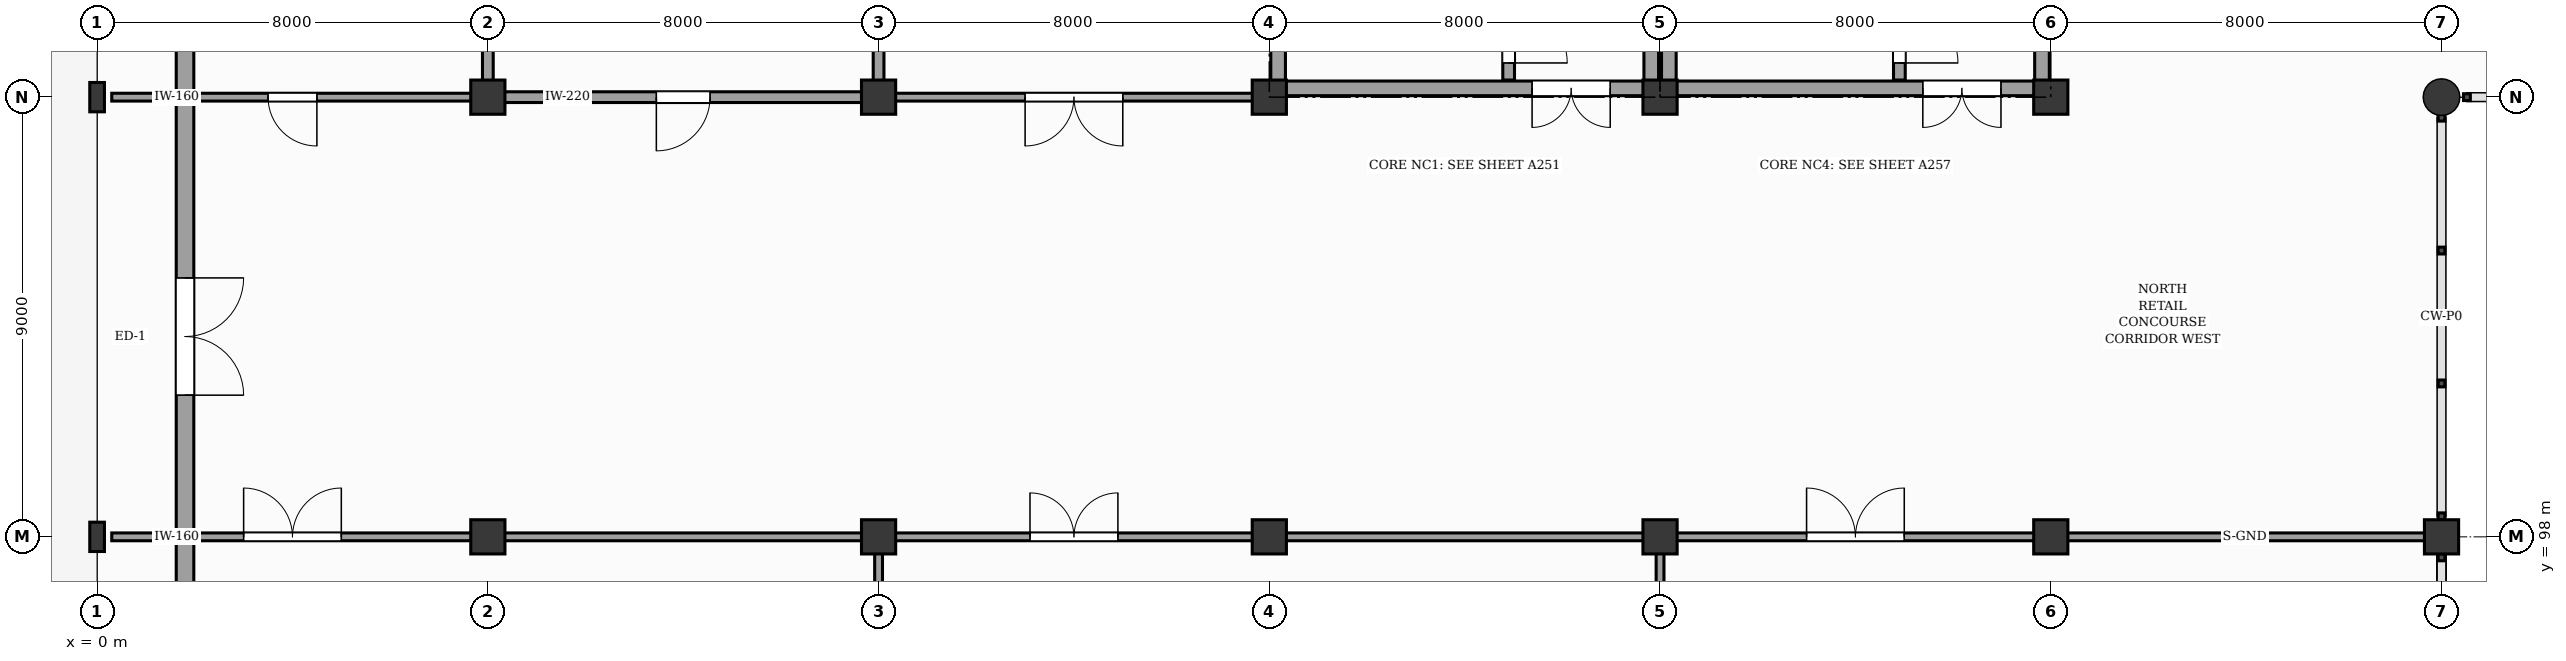
"""IFC4 building model, lengths in metres.
Left out: names, types, materials, properties, quantities, classifications, styles, units other than length and angle.
Written with IfcOpenShell. Run it as: python <this file> out.ifc"""

import sys

from ifc_helpers import new_model, si_unit, direction, frame, frame_2d, origin, origin_2d, place, context, subcontext, project, spatial, rectangle, circle, i_section, extrude, element, fill, save


model = new_model("IFC4")
c1 = context("Model", 3, precision=1e-05, world=origin(), true_north=direction((0.0, 1.0)))
c2 = subcontext(c1, "Body", "Model", "MODEL_VIEW")
j1 = project(units=[si_unit("LENGTHUNIT", "METRE"), si_unit("PLANEANGLEUNIT", "RADIAN")], contexts=[c1])
p1 = place(None, origin())
s1 = spatial("IfcSite", under=j1, at=p1, CompositionType="ELEMENT")
p2 = place(p1, origin())
s2 = spatial("IfcBuilding", under=s1, at=p2, CompositionType="ELEMENT")
p3 = place(p2, origin())
s3 = spatial("IfcBuildingStorey", under=s2, at=p3, CompositionType="ELEMENT", Elevation=0.0)
for number, where, z_axis, x_axis in (
    (1, (0.0, 98.0, -0.3), (0.0, 0.0, 1.0), (1.0, 0.0, 0.0)),
    (2, (0.0, 107.0, -0.3), (0.0, 0.0, 1.0), (1.0, 0.0, 0.0)),
):
    element("IfcColumn", number, at=place(p3, frame(where, z_axis=z_axis, x_axis=x_axis)), inside=s3, PredefinedType="COLUMN", context=c2, shape_type="SweptSolid", body=[
        extrude(i_section(OverallWidth=0.3, OverallDepth=0.6, WebThickness=0.015, FlangeThickness=0.03, FilletRadius=0.027, at=origin_2d()), origin(), (0.0, 0.0, 1.0), 5.1),
    ])
for number, where, z_axis, x_axis in (
    (3, (8.0, 98.0, -0.3), (0.0, 0.0, 1.0), (1.0, 0.0, 0.0)),
    (4, (8.0, 107.0, -0.3), (0.0, 0.0, 1.0), (1.0, 0.0, 0.0)),
    (5, (16.0, 98.0, -0.3), (0.0, 0.0, 1.0), (1.0, 0.0, 0.0)),
    (6, (16.0, 107.0, -0.3), (0.0, 0.0, 1.0), (1.0, 0.0, 0.0)),
    (7, (24.0, 98.0, -0.3), (0.0, 0.0, 1.0), (1.0, 0.0, 0.0)),
    (8, (24.0, 107.0, -0.3), (0.0, 0.0, 1.0), (1.0, 0.0, 0.0)),
    (9, (32.0, 98.0, -0.3), (0.0, 0.0, 1.0), (1.0, 0.0, 0.0)),
    (10, (32.0, 107.0, -0.3), (0.0, 0.0, 1.0), (1.0, 0.0, 0.0)),
    (11, (40.0, 98.0, -0.3), (0.0, 0.0, 1.0), (1.0, 0.0, 0.0)),
    (12, (40.0, 107.0, -0.3), (0.0, 0.0, 1.0), (1.0, 0.0, 0.0)),
    (13, (48.0, 98.0, -0.3), (0.0, 0.0, 1.0), (1.0, 0.0, 0.0)),
):
    element("IfcColumn", number, at=place(p3, frame(where, z_axis=z_axis, x_axis=x_axis)), inside=s3, PredefinedType="COLUMN", context=c2, shape_type="SweptSolid", body=[
        extrude(rectangle(XDim=0.7, YDim=0.7, at=origin_2d()), origin(), (0.0, 0.0, 1.0), 5.1),
    ])
p4 = place(p3, frame((48.0, 107.0, -0.3), z_axis=(0.0, 0.0, 1.0), x_axis=(1.0, 0.0, 0.0)))
e14 = element("IfcColumn", 14, at=p4, inside=s3, PredefinedType="PILASTER", context=c2, shape_type="SweptSolid", body=[
    extrude(circle(Radius=0.375, at=origin_2d()), origin(), (0.0, 0.0, 1.0), 5.1),
])
p5 = place(p3, frame((1.8, 89.0, 0.0), z_axis=(0.0, 0.0, 1.0), x_axis=(0.0, 1.0, 0.0)))
e15 = element("IfcWall", 15, at=p5, inside=s3, PredefinedType="SOLIDWALL", context=c2, shape_type="SweptSolid", body=[
    extrude(rectangle(XDim=9.0, YDim=0.36, at=frame_2d((4.5, 0.0))), origin(), (0.0, 0.0, 1.0), 3.71),
])
p6 = place(p5, frame((3.3, 0.0, 0.95)))
e16 = element("IfcOpeningElement", 16, at=p6, cuts=e15, PredefinedType="OPENING", context=c2, shape_type="SweptSolid", body=[
    extrude(rectangle(XDim=1.6, YDim=2.1, at=frame_2d((0.8, 1.05))), frame((0.0, 0.19, 0.0), z_axis=(0.0, -1.0, 0.0), x_axis=(1.0, 0.0, 0.0)), (0.0, 0.0, 1.0), 0.38),
])
p7 = place(p3, frame((1.8, 98.0, 0.0), z_axis=(0.0, 0.0, 1.0), x_axis=(0.0, 1.0, 0.0)))
e17 = element("IfcWall", 17, at=p7, inside=s3, PredefinedType="SOLIDWALL", context=c2, shape_type="SweptSolid", body=[
    extrude(rectangle(XDim=9.0, YDim=0.36, at=frame_2d((4.5, 0.0))), origin(), (0.0, 0.0, 1.0), 3.71),
])
p8 = place(p7, frame((2.9, 0.0, 0.0)))
e18 = element("IfcOpeningElement", 18, at=p8, cuts=e17, PredefinedType="OPENING", context=c2, shape_type="SweptSolid", body=[
    extrude(rectangle(XDim=2.4, YDim=2.35, at=frame_2d((1.2, 1.175))), frame((0.0, 0.19, 0.0), z_axis=(0.0, -1.0, 0.0), x_axis=(1.0, 0.0, 0.0)), (0.0, 0.0, 1.0), 0.38),
])
p9 = place(p3, frame((1.8, 107.0, 0.0), z_axis=(0.0, 0.0, 1.0), x_axis=(0.0, 1.0, 0.0)))
e19 = element("IfcWall", 19, at=p9, inside=s3, PredefinedType="SOLIDWALL", context=c2, shape_type="SweptSolid", body=[
    extrude(rectangle(XDim=7.2, YDim=0.36, at=frame_2d((3.6, 0.0))), origin(), (0.0, 0.0, 1.0), 3.76),
])
p10 = place(p9, frame((3.3, 0.0, 0.95)))
e20 = element("IfcOpeningElement", 20, at=p10, cuts=e19, PredefinedType="OPENING", context=c2, shape_type="SweptSolid", body=[
    extrude(rectangle(XDim=1.6, YDim=2.1, at=frame_2d((0.8, 1.05))), frame((0.0, 0.19, 0.0), z_axis=(0.0, -1.0, 0.0), x_axis=(1.0, 0.0, 0.0)), (0.0, 0.0, 1.0), 0.38),
])
p11 = place(p3, frame((28.9, 107.35, 0.0), z_axis=(0.0, 0.0, 1.0), x_axis=(0.0, 1.0, 0.0)))
e21 = element("IfcWall", 21, at=p11, inside=s3, PredefinedType="SHEAR", context=c2, shape_type="SweptSolid", body=[
    extrude(rectangle(XDim=8.3, YDim=0.24, at=frame_2d((4.15, 0.0))), origin(), (0.0, 0.0, 1.0), 4.52),
])
p12 = place(p11, frame((0.35, 0.0, 0.0)))
e22 = element("IfcOpeningElement", 22, at=p12, cuts=e21, PredefinedType="OPENING", context=c2, shape_type="SweptSolid", body=[
    extrude(rectangle(XDim=1.2, YDim=2.15, at=frame_2d((0.6, 1.075))), frame((0.0, 0.13, 0.0), z_axis=(0.0, -1.0, 0.0), x_axis=(1.0, 0.0, 0.0)), (0.0, 0.0, 1.0), 0.26),
])
for number, where, z_axis, x_axis in (
    (23, (24.18, 107.18, 0.0), (0.0, 0.0, 1.0), (0.0, 1.0, 0.0)),
    (24, (31.82, 107.18, 0.0), (0.0, 0.0, 1.0), (0.0, 1.0, 0.0)),
):
    element("IfcWall", number, at=place(p3, frame(where, z_axis=z_axis, x_axis=x_axis)), inside=s3, PredefinedType="SHEAR", context=c2, shape_type="SweptSolid", body=[
        extrude(rectangle(XDim=8.64, YDim=0.3, at=frame_2d((4.32, 0.0))), origin(), (0.0, 0.0, 1.0), 4.52),
    ])
p13 = place(p3, frame((24.03, 107.18, 0.0), z_axis=(0.0, 0.0, 1.0), x_axis=(1.0, 0.0, 0.0)))
e25 = element("IfcWall", 25, at=p13, inside=s3, PredefinedType="SHEAR", context=c2, shape_type="SweptSolid", body=[
    extrude(rectangle(XDim=7.94, YDim=0.3, at=frame_2d((3.97, 0.0))), origin(), (0.0, 0.0, 1.0), 4.52),
])
p14 = place(p13, frame((5.35, 0.0, 0.0)))
e26 = element("IfcOpeningElement", 26, at=p14, cuts=e25, PredefinedType="OPENING", context=c2, shape_type="SweptSolid", body=[
    extrude(rectangle(XDim=1.6, YDim=2.15, at=frame_2d((0.8, 1.075))), frame((0.0, 0.16, 0.0), z_axis=(0.0, -1.0, 0.0), x_axis=(1.0, 0.0, 0.0)), (0.0, 0.0, 1.0), 0.32),
])
p15 = place(p3, frame((36.9, 107.35, 0.0), z_axis=(0.0, 0.0, 1.0), x_axis=(0.0, 1.0, 0.0)))
e27 = element("IfcWall", 27, at=p15, inside=s3, PredefinedType="SHEAR", context=c2, shape_type="SweptSolid", body=[
    extrude(rectangle(XDim=8.3, YDim=0.24, at=frame_2d((4.15, 0.0))), origin(), (0.0, 0.0, 1.0), 4.52),
])
p16 = place(p15, frame((0.35, 0.0, 0.0)))
e28 = element("IfcOpeningElement", 28, at=p16, cuts=e27, PredefinedType="OPENING", context=c2, shape_type="SweptSolid", body=[
    extrude(rectangle(XDim=1.2, YDim=2.15, at=frame_2d((0.6, 1.075))), frame((0.0, 0.13, 0.0), z_axis=(0.0, -1.0, 0.0), x_axis=(1.0, 0.0, 0.0)), (0.0, 0.0, 1.0), 0.26),
])
for number, where, z_axis, x_axis in (
    (29, (32.18, 107.18, 0.0), (0.0, 0.0, 1.0), (0.0, 1.0, 0.0)),
    (30, (39.82, 107.18, 0.0), (0.0, 0.0, 1.0), (0.0, 1.0, 0.0)),
):
    element("IfcWall", number, at=place(p3, frame(where, z_axis=z_axis, x_axis=x_axis)), inside=s3, PredefinedType="SHEAR", context=c2, shape_type="SweptSolid", body=[
        extrude(rectangle(XDim=8.64, YDim=0.3, at=frame_2d((4.32, 0.0))), origin(), (0.0, 0.0, 1.0), 4.52),
    ])
p17 = place(p3, frame((32.03, 107.18, 0.0), z_axis=(0.0, 0.0, 1.0), x_axis=(1.0, 0.0, 0.0)))
e31 = element("IfcWall", 31, at=p17, inside=s3, PredefinedType="SHEAR", context=c2, shape_type="SweptSolid", body=[
    extrude(rectangle(XDim=7.94, YDim=0.3, at=frame_2d((3.97, 0.0))), origin(), (0.0, 0.0, 1.0), 4.52),
])
p18 = place(p17, frame((5.35, 0.0, 0.0)))
e32 = element("IfcOpeningElement", 32, at=p18, cuts=e31, PredefinedType="OPENING", context=c2, shape_type="SweptSolid", body=[
    extrude(rectangle(XDim=1.6, YDim=2.15, at=frame_2d((0.8, 1.075))), frame((0.0, 0.16, 0.0), z_axis=(0.0, -1.0, 0.0), x_axis=(1.0, 0.0, 0.0)), (0.0, 0.0, 1.0), 0.32),
])
p19 = place(p3, frame((8.3, 107.0, 0.0), z_axis=(0.0, 0.0, 1.0), x_axis=(1.0, 0.0, 0.0)))
e33 = element("IfcWall", 33, at=p19, inside=s3, PredefinedType="SOLIDWALL", context=c2, shape_type="SweptSolid", body=[
    extrude(rectangle(XDim=7.4, YDim=0.22, at=frame_2d((3.7, 0.0))), origin(), (0.0, 0.0, 1.0), 3.7),
])
p20 = place(p19, frame((3.15, 0.0, 0.0)))
e34 = element("IfcOpeningElement", 34, at=p20, cuts=e33, PredefinedType="OPENING", context=c2, shape_type="SweptSolid", body=[
    extrude(rectangle(XDim=1.1, YDim=2.15, at=frame_2d((0.55, 1.075))), frame((0.0, 0.12, 0.0), z_axis=(0.0, -1.0, 0.0), x_axis=(1.0, 0.0, 0.0)), (0.0, 0.0, 1.0), 0.24),
])
for number, where, z_axis, x_axis in (
    (35, (8.0, 107.3, 0.0), (0.0, 0.0, 1.0), (0.0, 1.0, 0.0)),
    (36, (16.0, 107.3, 0.0), (0.0, 0.0, 1.0), (0.0, 1.0, 0.0)),
):
    element("IfcWall", number, at=place(p3, frame(where, z_axis=z_axis, x_axis=x_axis)), inside=s3, PredefinedType="SOLIDWALL", context=c2, shape_type="SweptSolid", body=[
        extrude(rectangle(XDim=6.74, YDim=0.22, at=frame_2d((3.37, 0.0))), origin(), (0.0, 0.0, 1.0), 3.7),
    ])
p21 = place(p3, frame((0.3, 107.0, 0.0), z_axis=(0.0, 0.0, 1.0), x_axis=(1.0, 0.0, 0.0)))
e37 = element("IfcWall", 37, at=p21, inside=s3, PredefinedType="PARTITIONING", context=c2, shape_type="SweptSolid", body=[
    extrude(rectangle(XDim=7.4, YDim=0.16, at=frame_2d((3.7, 0.0))), origin(), (0.0, 0.0, 1.0), 3.7),
])
p22 = place(p21, frame((3.2, 0.0, 0.0)))
e38 = element("IfcOpeningElement", 38, at=p22, cuts=e37, PredefinedType="OPENING", context=c2, shape_type="SweptSolid", body=[
    extrude(rectangle(XDim=1.0, YDim=2.1, at=frame_2d((0.5, 1.05))), frame((0.0, 0.09, 0.0), z_axis=(0.0, -1.0, 0.0), x_axis=(1.0, 0.0, 0.0)), (0.0, 0.0, 1.0), 0.18),
])
p23 = place(p3, frame((16.3, 107.0, 0.0), z_axis=(0.0, 0.0, 1.0), x_axis=(1.0, 0.0, 0.0)))
e39 = element("IfcWall", 39, at=p23, inside=s3, PredefinedType="PARTITIONING", context=c2, shape_type="SweptSolid", body=[
    extrude(rectangle(XDim=7.4, YDim=0.16, at=frame_2d((3.7, 0.0))), origin(), (0.0, 0.0, 1.0), 3.7),
])
p24 = place(p23, frame((2.7, 0.0, 0.0)))
e40 = element("IfcOpeningElement", 40, at=p24, cuts=e39, PredefinedType="OPENING", context=c2, shape_type="SweptSolid", body=[
    extrude(rectangle(XDim=2.0, YDim=2.3, at=frame_2d((1.0, 1.15))), frame((0.0, 0.09, 0.0), z_axis=(0.0, -1.0, 0.0), x_axis=(1.0, 0.0, 0.0)), (0.0, 0.0, 1.0), 0.18),
])
p25 = place(p3, frame((0.3, 98.0, 0.0), z_axis=(0.0, 0.0, 1.0), x_axis=(1.0, 0.0, 0.0)))
e41 = element("IfcWall", 41, at=p25, inside=s3, PredefinedType="PARTITIONING", context=c2, shape_type="SweptSolid", body=[
    extrude(rectangle(XDim=7.4, YDim=0.16, at=frame_2d((3.7, 0.0))), origin(), (0.0, 0.0, 1.0), 3.7),
])
p26 = place(p25, frame((2.7, 0.0, 0.0)))
e42 = element("IfcOpeningElement", 42, at=p26, cuts=e41, PredefinedType="OPENING", context=c2, shape_type="SweptSolid", body=[
    extrude(rectangle(XDim=2.0, YDim=2.3, at=frame_2d((1.0, 1.15))), frame((0.0, 0.09, 0.0), z_axis=(0.0, -1.0, 0.0), x_axis=(1.0, 0.0, 0.0)), (0.0, 0.0, 1.0), 0.18),
])
p27 = place(p3, frame((8.3, 98.0, 0.0), z_axis=(0.0, 0.0, 1.0), x_axis=(1.0, 0.0, 0.0)))
e43 = element("IfcWall", 43, at=p27, inside=s3, PredefinedType="PARTITIONING", context=c2, shape_type="SweptSolid", body=[
    extrude(rectangle(XDim=7.4, YDim=0.16, at=frame_2d((3.7, 0.0))), origin(), (0.0, 0.0, 1.0), 3.7),
])
p28 = place(p3, frame((16.0, 89.3, 0.0), z_axis=(0.0, 0.0, 1.0), x_axis=(0.0, 1.0, 0.0)))
e44 = element("IfcWall", 44, at=p28, inside=s3, PredefinedType="PARTITIONING", context=c2, shape_type="SweptSolid", body=[
    extrude(rectangle(XDim=8.4, YDim=0.16, at=frame_2d((4.2, 0.0))), origin(), (0.0, 0.0, 1.0), 3.7),
])
p29 = place(p3, frame((16.3, 98.0, 0.0), z_axis=(0.0, 0.0, 1.0), x_axis=(1.0, 0.0, 0.0)))
e45 = element("IfcWall", 45, at=p29, inside=s3, PredefinedType="PARTITIONING", context=c2, shape_type="SweptSolid", body=[
    extrude(rectangle(XDim=7.4, YDim=0.16, at=frame_2d((3.7, 0.0))), origin(), (0.0, 0.0, 1.0), 3.7),
])
p30 = place(p29, frame((2.8, 0.0, 0.0)))
e46 = element("IfcOpeningElement", 46, at=p30, cuts=e45, PredefinedType="OPENING", context=c2, shape_type="SweptSolid", body=[
    extrude(rectangle(XDim=1.8, YDim=2.25, at=frame_2d((0.9, 1.125))), frame((0.0, 0.09, 0.0), z_axis=(0.0, -1.0, 0.0), x_axis=(1.0, 0.0, 0.0)), (0.0, 0.0, 1.0), 0.18),
])
p31 = place(p3, frame((24.3, 98.0, 0.0), z_axis=(0.0, 0.0, 1.0), x_axis=(1.0, 0.0, 0.0)))
e47 = element("IfcWall", 47, at=p31, inside=s3, PredefinedType="PARTITIONING", context=c2, shape_type="SweptSolid", body=[
    extrude(rectangle(XDim=7.4, YDim=0.16, at=frame_2d((3.7, 0.0))), origin(), (0.0, 0.0, 1.0), 3.7),
])
p32 = place(p3, frame((32.0, 89.3, 0.0), z_axis=(0.0, 0.0, 1.0), x_axis=(0.0, 1.0, 0.0)))
e48 = element("IfcWall", 48, at=p32, inside=s3, PredefinedType="PARTITIONING", context=c2, shape_type="SweptSolid", body=[
    extrude(rectangle(XDim=8.4, YDim=0.16, at=frame_2d((4.2, 0.0))), origin(), (0.0, 0.0, 1.0), 3.7),
])
p33 = place(p3, frame((32.3, 98.0, 0.0), z_axis=(0.0, 0.0, 1.0), x_axis=(1.0, 0.0, 0.0)))
e49 = element("IfcWall", 49, at=p33, inside=s3, PredefinedType="PARTITIONING", context=c2, shape_type="SweptSolid", body=[
    extrude(rectangle(XDim=7.4, YDim=0.16, at=frame_2d((3.7, 0.0))), origin(), (0.0, 0.0, 1.0), 3.7),
])
p34 = place(p33, frame((2.7, 0.0, 0.0)))
e50 = element("IfcOpeningElement", 50, at=p34, cuts=e49, PredefinedType="OPENING", context=c2, shape_type="SweptSolid", body=[
    extrude(rectangle(XDim=2.0, YDim=2.3, at=frame_2d((1.0, 1.15))), frame((0.0, 0.09, 0.0), z_axis=(0.0, -1.0, 0.0), x_axis=(1.0, 0.0, 0.0)), (0.0, 0.0, 1.0), 0.18),
])
p35 = place(p3, frame((40.3, 98.0, 0.0), z_axis=(0.0, 0.0, 1.0), x_axis=(1.0, 0.0, 0.0)))
e51 = element("IfcWall", 51, at=p35, inside=s3, PredefinedType="PARTITIONING", context=c2, shape_type="SweptSolid", body=[
    extrude(rectangle(XDim=7.4, YDim=0.16, at=frame_2d((3.7, 0.0))), origin(), (0.0, 0.0, 1.0), 3.7),
])
p36 = place(p3, frame((48.0, 89.3, 0.0), z_axis=(0.0, 0.0, 1.0), x_axis=(0.0, 1.0, 0.0)))
e52 = element("IfcWall", 52, at=p36, inside=s3, PredefinedType="PARTITIONING", context=c2, shape_type="SweptSolid", body=[
    extrude(rectangle(XDim=8.4, YDim=0.16, at=frame_2d((4.2, 0.0))), origin(), (0.0, 0.0, 1.0), 3.7),
])
p37 = place(p8, frame((2.4, 0.0, 0.0), z_axis=(0.0, 0.0, 1.0), x_axis=(-1.0, 0.0, 0.0)))
e53 = element("IfcDoor", 53, at=p37, inside=s3, OperationType="DOUBLE_DOOR_SINGLE_SWING", PredefinedType="DOOR", context=c2, shape_type="SweptSolid", body=[
    extrude(rectangle(XDim=2.4, YDim=2.35, at=frame_2d((1.2, 1.175))), frame((0.0, 0.025, 0.0), z_axis=(0.0, -1.0, 0.0), x_axis=(1.0, 0.0, 0.0)), (0.0, 0.0, 1.0), 0.05),
])
fill(e18, e53)
p38 = place(p12, frame((1.2, 0.0, 0.0), z_axis=(0.0, 0.0, 1.0), x_axis=(-1.0, 0.0, 0.0)))
e54 = element("IfcDoor", 54, at=p38, inside=s3, OperationType="SINGLE_SWING_LEFT", PredefinedType="DOOR", context=c2, shape_type="SweptSolid", body=[
    extrude(rectangle(XDim=1.2, YDim=2.15, at=frame_2d((0.6, 1.075))), frame((0.0, 0.025, 0.0), z_axis=(0.0, -1.0, 0.0), x_axis=(1.0, 0.0, 0.0)), (0.0, 0.0, 1.0), 0.05),
])
fill(e22, e54)
p39 = place(p14, frame((1.6, 0.0, 0.0), z_axis=(0.0, 0.0, 1.0), x_axis=(-1.0, 0.0, 0.0)))
e55 = element("IfcDoor", 55, at=p39, inside=s3, OperationType="DOUBLE_DOOR_SINGLE_SWING", PredefinedType="DOOR", context=c2, shape_type="SweptSolid", body=[
    extrude(rectangle(XDim=1.6, YDim=2.15, at=frame_2d((0.8, 1.075))), frame((0.0, 0.025, 0.0), z_axis=(0.0, -1.0, 0.0), x_axis=(1.0, 0.0, 0.0)), (0.0, 0.0, 1.0), 0.05),
])
fill(e26, e55)
p40 = place(p16, frame((1.2, 0.0, 0.0), z_axis=(0.0, 0.0, 1.0), x_axis=(-1.0, 0.0, 0.0)))
e56 = element("IfcDoor", 56, at=p40, inside=s3, OperationType="SINGLE_SWING_LEFT", PredefinedType="DOOR", context=c2, shape_type="SweptSolid", body=[
    extrude(rectangle(XDim=1.2, YDim=2.15, at=frame_2d((0.6, 1.075))), frame((0.0, 0.025, 0.0), z_axis=(0.0, -1.0, 0.0), x_axis=(1.0, 0.0, 0.0)), (0.0, 0.0, 1.0), 0.05),
])
fill(e28, e56)
p41 = place(p18, frame((1.6, 0.0, 0.0), z_axis=(0.0, 0.0, 1.0), x_axis=(-1.0, 0.0, 0.0)))
e57 = element("IfcDoor", 57, at=p41, inside=s3, OperationType="DOUBLE_DOOR_SINGLE_SWING", PredefinedType="DOOR", context=c2, shape_type="SweptSolid", body=[
    extrude(rectangle(XDim=1.6, YDim=2.15, at=frame_2d((0.8, 1.075))), frame((0.0, 0.025, 0.0), z_axis=(0.0, -1.0, 0.0), x_axis=(1.0, 0.0, 0.0)), (0.0, 0.0, 1.0), 0.05),
])
fill(e32, e57)
p42 = place(p20, frame((1.1, 0.0, 0.0), z_axis=(0.0, 0.0, 1.0), x_axis=(-1.0, 0.0, 0.0)))
e58 = element("IfcDoor", 58, at=p42, inside=s3, OperationType="SINGLE_SWING_LEFT", PredefinedType="DOOR", context=c2, shape_type="SweptSolid", body=[
    extrude(rectangle(XDim=1.1, YDim=2.15, at=frame_2d((0.55, 1.075))), frame((0.0, 0.025, 0.0), z_axis=(0.0, -1.0, 0.0), x_axis=(1.0, 0.0, 0.0)), (0.0, 0.0, 1.0), 0.05),
])
fill(e34, e58)
p43 = place(p22, frame((1.0, 0.0, 0.0), z_axis=(0.0, 0.0, 1.0), x_axis=(-1.0, 0.0, 0.0)))
e59 = element("IfcDoor", 59, at=p43, inside=s3, OperationType="SINGLE_SWING_RIGHT", PredefinedType="DOOR", context=c2, shape_type="SweptSolid", body=[
    extrude(rectangle(XDim=1.0, YDim=2.1, at=frame_2d((0.5, 1.05))), frame((0.0, 0.025, 0.0), z_axis=(0.0, -1.0, 0.0), x_axis=(1.0, 0.0, 0.0)), (0.0, 0.0, 1.0), 0.05),
])
fill(e38, e59)
p44 = place(p24, frame((2.0, 0.0, 0.0), z_axis=(0.0, 0.0, 1.0), x_axis=(-1.0, 0.0, 0.0)))
e60 = element("IfcDoor", 60, at=p44, inside=s3, OperationType="DOUBLE_DOOR_SINGLE_SWING", PredefinedType="DOOR", context=c2, shape_type="SweptSolid", body=[
    extrude(rectangle(XDim=2.0, YDim=2.3, at=frame_2d((1.0, 1.15))), frame((0.0, 0.025, 0.0), z_axis=(0.0, -1.0, 0.0), x_axis=(1.0, 0.0, 0.0)), (0.0, 0.0, 1.0), 0.05),
])
fill(e40, e60)
p45 = place(p26, origin())
e61 = element("IfcDoor", 61, at=p45, inside=s3, OperationType="DOUBLE_DOOR_SINGLE_SWING", PredefinedType="DOOR", context=c2, shape_type="SweptSolid", body=[
    extrude(rectangle(XDim=2.0, YDim=2.3, at=frame_2d((1.0, 1.15))), frame((0.0, 0.025, 0.0), z_axis=(0.0, -1.0, 0.0), x_axis=(1.0, 0.0, 0.0)), (0.0, 0.0, 1.0), 0.05),
])
fill(e42, e61)
p46 = place(p30, origin())
e62 = element("IfcDoor", 62, at=p46, inside=s3, OperationType="DOUBLE_DOOR_SINGLE_SWING", PredefinedType="DOOR", context=c2, shape_type="SweptSolid", body=[
    extrude(rectangle(XDim=1.8, YDim=2.25, at=frame_2d((0.9, 1.125))), frame((0.0, 0.025, 0.0), z_axis=(0.0, -1.0, 0.0), x_axis=(1.0, 0.0, 0.0)), (0.0, 0.0, 1.0), 0.05),
])
fill(e46, e62)
p47 = place(p34, origin())
e63 = element("IfcDoor", 63, at=p47, inside=s3, OperationType="DOUBLE_DOOR_SINGLE_SWING", PredefinedType="DOOR", context=c2, shape_type="SweptSolid", body=[
    extrude(rectangle(XDim=2.0, YDim=2.3, at=frame_2d((1.0, 1.15))), frame((0.0, 0.025, 0.0), z_axis=(0.0, -1.0, 0.0), x_axis=(1.0, 0.0, 0.0)), (0.0, 0.0, 1.0), 0.05),
])
fill(e50, e63)
save(model, sys.argv[1])
